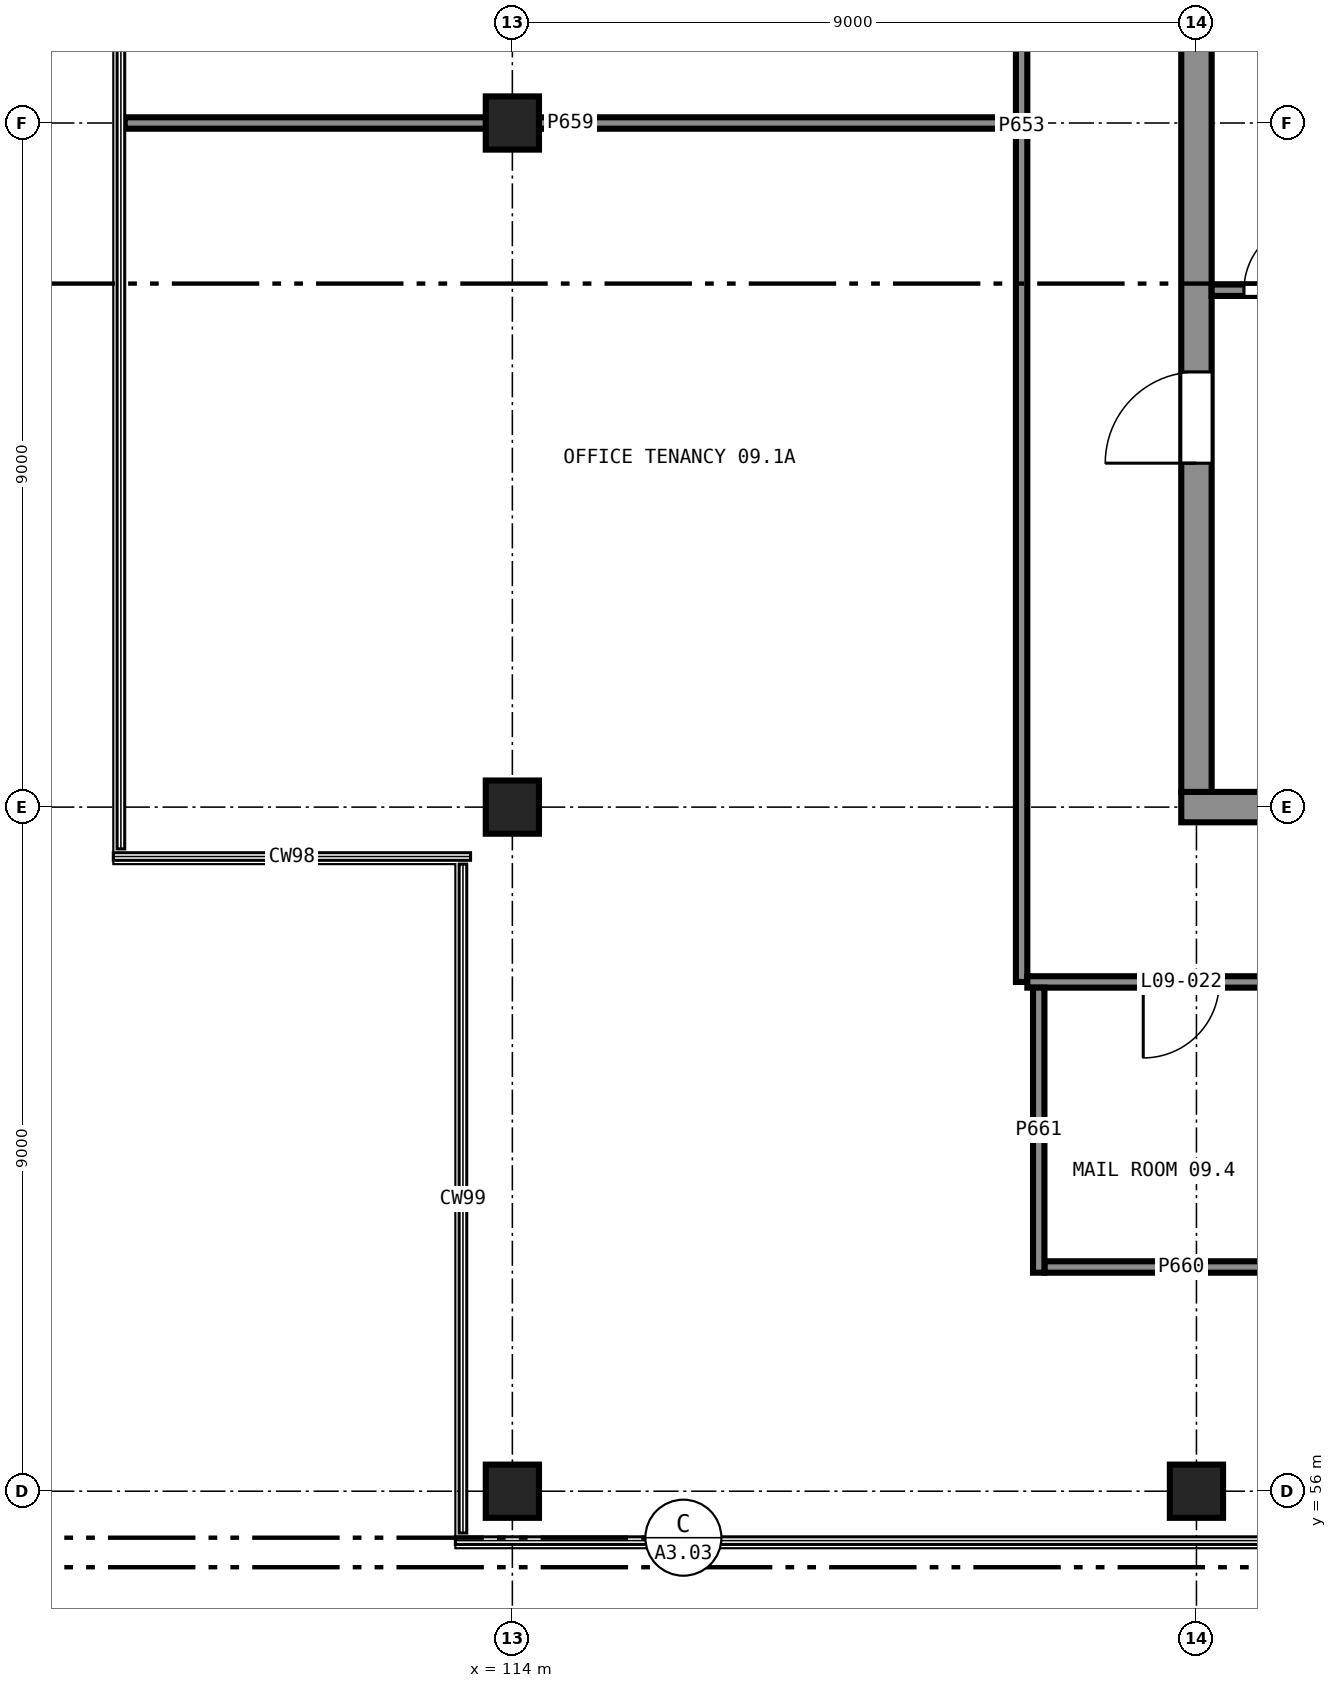
"""IFC4 building model, lengths in metres.
Left out: names, types, materials, properties, quantities, classifications, styles, units other than length and angle.
Written with IfcOpenShell. Run it as: python <this file> out.ifc"""

import sys

from ifc_helpers import new_model, si_unit, direction, frame, frame_2d, origin, origin_2d, place, context, subcontext, project, spatial, rectangle, extrude, element, fill, save


model = new_model("IFC4")
c1 = context("Model", 3, precision=1e-05, world=origin(), true_north=direction((0.0, 1.0)))
c2 = subcontext(c1, "Body", "Model", "MODEL_VIEW")
j1 = project(units=[si_unit("LENGTHUNIT", "METRE"), si_unit("PLANEANGLEUNIT", "RADIAN")], contexts=[c1])
p1 = place(None, origin())
s1 = spatial("IfcSite", under=j1, at=p1, CompositionType="ELEMENT")
p2 = place(p1, origin())
s2 = spatial("IfcBuilding", under=s1, at=p2, CompositionType="ELEMENT")
p3 = place(p2, frame((0.0, 0.0, 37.5)))
s3 = spatial("IfcBuildingStorey", under=s2, at=p3, CompositionType="ELEMENT", Elevation=37.5)
for number, where, z_axis, x_axis in (
    (1, (114.0, 56.0, 0.0), (0.0, 0.0, 1.0), (1.0, 0.0, 0.0)),
    (2, (114.0, 65.0, 0.0), (0.0, 0.0, 1.0), (1.0, 0.0, 0.0)),
    (3, (114.0, 74.0, 0.0), (0.0, 0.0, 1.0), (1.0, 0.0, 0.0)),
    (4, (123.0, 56.0, 0.0), (0.0, 0.0, 1.0), (1.0, 0.0, 0.0)),
):
    element("IfcColumn", number, at=place(p3, frame(where, z_axis=z_axis, x_axis=x_axis)), inside=s3, PredefinedType="COLUMN", context=c2, shape_type="SweptSolid", body=[
        extrude(rectangle(XDim=0.7, YDim=0.7, at=origin_2d()), origin(), (0.0, 0.0, 1.0), 4.0),
    ])
p4 = place(p3, frame((122.8, 65.0, 0.0), z_axis=(0.0, 0.0, 1.0), x_axis=(1.0, 0.0, 0.0)))
e5 = element("IfcWall", 5, at=p4, inside=s3, PredefinedType="SHEAR", context=c2, shape_type="SweptSolid", body=[
    extrude(rectangle(XDim=18.4, YDim=0.4, at=frame_2d((9.2, 0.0))), origin(), (0.0, 0.0, 1.0), 4.0),
])
p5 = place(p3, frame((123.0, 82.8, 0.0), z_axis=(0.0, 0.0, 1.0), x_axis=(0.0, -1.0, 0.0)))
e6 = element("IfcWall", 6, at=p5, inside=s3, PredefinedType="SHEAR", context=c2, shape_type="SweptSolid", body=[
    extrude(rectangle(XDim=17.6, YDim=0.4, at=frame_2d((8.8, 0.0))), origin(), (0.0, 0.0, 1.0), 4.0),
])
p6 = place(p5, frame((12.075, 0.0, 0.0)))
e7 = element("IfcOpeningElement", 7, at=p6, cuts=e6, PredefinedType="OPENING", context=c2, shape_type="SweptSolid", body=[
    extrude(rectangle(XDim=1.2, YDim=2.1, at=frame_2d((0.6, 1.05))), frame((0.0, 0.21, 0.0), z_axis=(0.0, -1.0, 0.0), x_axis=(1.0, 0.0, 0.0)), (0.0, 0.0, 1.0), 0.42),
])
p7 = place(p5, frame((4.325, 0.0, 0.0)))
e8 = element("IfcOpeningElement", 8, at=p7, cuts=e6, PredefinedType="OPENING", context=c2, shape_type="SweptSolid", body=[
    extrude(rectangle(XDim=1.2, YDim=2.1, at=frame_2d((0.6, 1.05))), frame((0.0, 0.21, 0.0), z_axis=(0.0, -1.0, 0.0), x_axis=(1.0, 0.0, 0.0)), (0.0, 0.0, 1.0), 0.42),
])
p8 = place(p3, frame((123.2, 71.8, 0.0), z_axis=(0.0, 0.0, 1.0), x_axis=(1.0, 0.0, 0.0)))
e9 = element("IfcWall", 9, at=p8, inside=s3, PredefinedType="PARTITIONING", context=c2, shape_type="SweptSolid", body=[
    extrude(rectangle(XDim=1.65, YDim=0.15, at=frame_2d((0.825, 0.0))), origin(), (0.0, 0.0, 1.0), 3.58),
])
p9 = place(p8, frame((0.425, 0.0, 0.0)))
e10 = element("IfcOpeningElement", 10, at=p9, cuts=e9, PredefinedType="OPENING", context=c2, shape_type="SweptSolid", body=[
    extrude(rectangle(XDim=0.9, YDim=2.1, at=frame_2d((0.45, 1.05))), frame((0.0, 0.085, 0.0), z_axis=(0.0, -1.0, 0.0), x_axis=(1.0, 0.0, 0.0)), (0.0, 0.0, 1.0), 0.17),
])
p10 = place(p3, frame((120.7, 62.7, 0.0), z_axis=(0.0, 0.0, 1.0), x_axis=(0.0, 1.0, 0.0)))
e11 = element("IfcWall", 11, at=p10, inside=s3, PredefinedType="PARTITIONING", context=c2, shape_type="SweptSolid", body=[
    extrude(rectangle(XDim=22.525, YDim=0.15, at=frame_2d((11.263, 0.0))), origin(), (0.0, 0.0, 1.0), 3.58),
])
p11 = place(p10, frame((16.435, 0.0, 0.0)))
e12 = element("IfcOpeningElement", 12, at=p11, cuts=e11, PredefinedType="OPENING", context=c2, shape_type="SweptSolid", body=[
    extrude(rectangle(XDim=1.0, YDim=2.1, at=frame_2d((0.5, 1.05))), frame((0.0, 0.085, 0.0), z_axis=(0.0, -1.0, 0.0), x_axis=(1.0, 0.0, 0.0)), (0.0, 0.0, 1.0), 0.17),
])
p12 = place(p3, frame((132.6, 62.7, 0.0), z_axis=(0.0, 0.0, 1.0), x_axis=(-1.0, 0.0, 0.0)))
e13 = element("IfcWall", 13, at=p12, inside=s3, PredefinedType="PARTITIONING", context=c2, shape_type="SweptSolid", body=[
    extrude(rectangle(XDim=11.825, YDim=0.15, at=frame_2d((5.913, 0.0))), origin(), (0.0, 0.0, 1.0), 3.58),
])
p13 = place(p12, frame((9.3, 0.0, 0.0)))
e14 = element("IfcOpeningElement", 14, at=p13, cuts=e13, PredefinedType="OPENING", context=c2, shape_type="SweptSolid", body=[
    extrude(rectangle(XDim=1.0, YDim=2.1, at=frame_2d((0.5, 1.05))), frame((0.0, 0.085, 0.0), z_axis=(0.0, -1.0, 0.0), x_axis=(1.0, 0.0, 0.0)), (0.0, 0.0, 1.0), 0.17),
])
p14 = place(p12, frame((5.427, 0.0, 0.0)))
e15 = element("IfcOpeningElement", 15, at=p14, cuts=e13, PredefinedType="OPENING", context=c2, shape_type="SweptSolid", body=[
    extrude(rectangle(XDim=1.0, YDim=2.1, at=frame_2d((0.5, 1.05))), frame((0.0, 0.085, 0.0), z_axis=(0.0, -1.0, 0.0), x_axis=(1.0, 0.0, 0.0)), (0.0, 0.0, 1.0), 0.17),
])
p15 = place(p3, frame((108.9, 74.0, 0.0), z_axis=(0.0, 0.0, 1.0), x_axis=(1.0, 0.0, 0.0)))
e16 = element("IfcWall", 16, at=p15, inside=s3, PredefinedType="PARTITIONING", context=c2, shape_type="SweptSolid", body=[
    extrude(rectangle(XDim=11.726, YDim=0.15, at=frame_2d((5.863, 0.0))), origin(), (0.0, 0.0, 1.0), 2.68),
])
p16 = place(p3, frame((121.0, 58.95, 0.0), z_axis=(0.0, 0.0, 1.0), x_axis=(1.0, 0.0, 0.0)))
e17 = element("IfcWall", 17, at=p16, inside=s3, PredefinedType="PARTITIONING", context=c2, shape_type="SweptSolid", body=[
    extrude(rectangle(XDim=3.6, YDim=0.15, at=frame_2d((1.8, 0.0))), origin(), (0.0, 0.0, 1.0), 3.58),
])
p17 = place(p3, frame((120.925, 62.625, 0.0), z_axis=(0.0, 0.0, 1.0), x_axis=(0.0, -1.0, 0.0)))
e18 = element("IfcWall", 18, at=p17, inside=s3, PredefinedType="PARTITIONING", context=c2, shape_type="SweptSolid", body=[
    extrude(rectangle(XDim=3.75, YDim=0.15, at=frame_2d((1.875, 0.0))), origin(), (0.0, 0.0, 1.0), 3.58),
])
p18 = place(p6, frame((1.2, 0.0, 0.0), z_axis=(0.0, 0.0, 1.0), x_axis=(-1.0, 0.0, 0.0)))
e19 = element("IfcDoor", 19, at=p18, inside=s3, OperationType="SINGLE_SWING_RIGHT", PredefinedType="DOOR", context=c2, shape_type="SweptSolid", body=[
    extrude(rectangle(XDim=1.2, YDim=2.1, at=frame_2d((0.6, 1.05))), frame((0.0, 0.025, 0.0), z_axis=(0.0, -1.0, 0.0), x_axis=(1.0, 0.0, 0.0)), (0.0, 0.0, 1.0), 0.05),
])
fill(e7, e19)
p19 = place(p9, origin())
e20 = element("IfcDoor", 20, at=p19, inside=s3, OperationType="SINGLE_SWING_LEFT", PredefinedType="DOOR", context=c2, shape_type="SweptSolid", body=[
    extrude(rectangle(XDim=0.9, YDim=2.1, at=frame_2d((0.45, 1.05))), frame((0.0, 0.025, 0.0), z_axis=(0.0, -1.0, 0.0), x_axis=(1.0, 0.0, 0.0)), (0.0, 0.0, 1.0), 0.05),
])
fill(e10, e20)
p20 = place(p13, origin())
e21 = element("IfcDoor", 21, at=p20, inside=s3, OperationType="SINGLE_SWING_LEFT", PredefinedType="DOOR", context=c2, shape_type="SweptSolid", body=[
    extrude(rectangle(XDim=1.0, YDim=2.1, at=frame_2d((0.5, 1.05))), frame((0.0, 0.025, 0.0), z_axis=(0.0, -1.0, 0.0), x_axis=(1.0, 0.0, 0.0)), (0.0, 0.0, 1.0), 0.05),
])
fill(e14, e21)
save(model, sys.argv[1])
